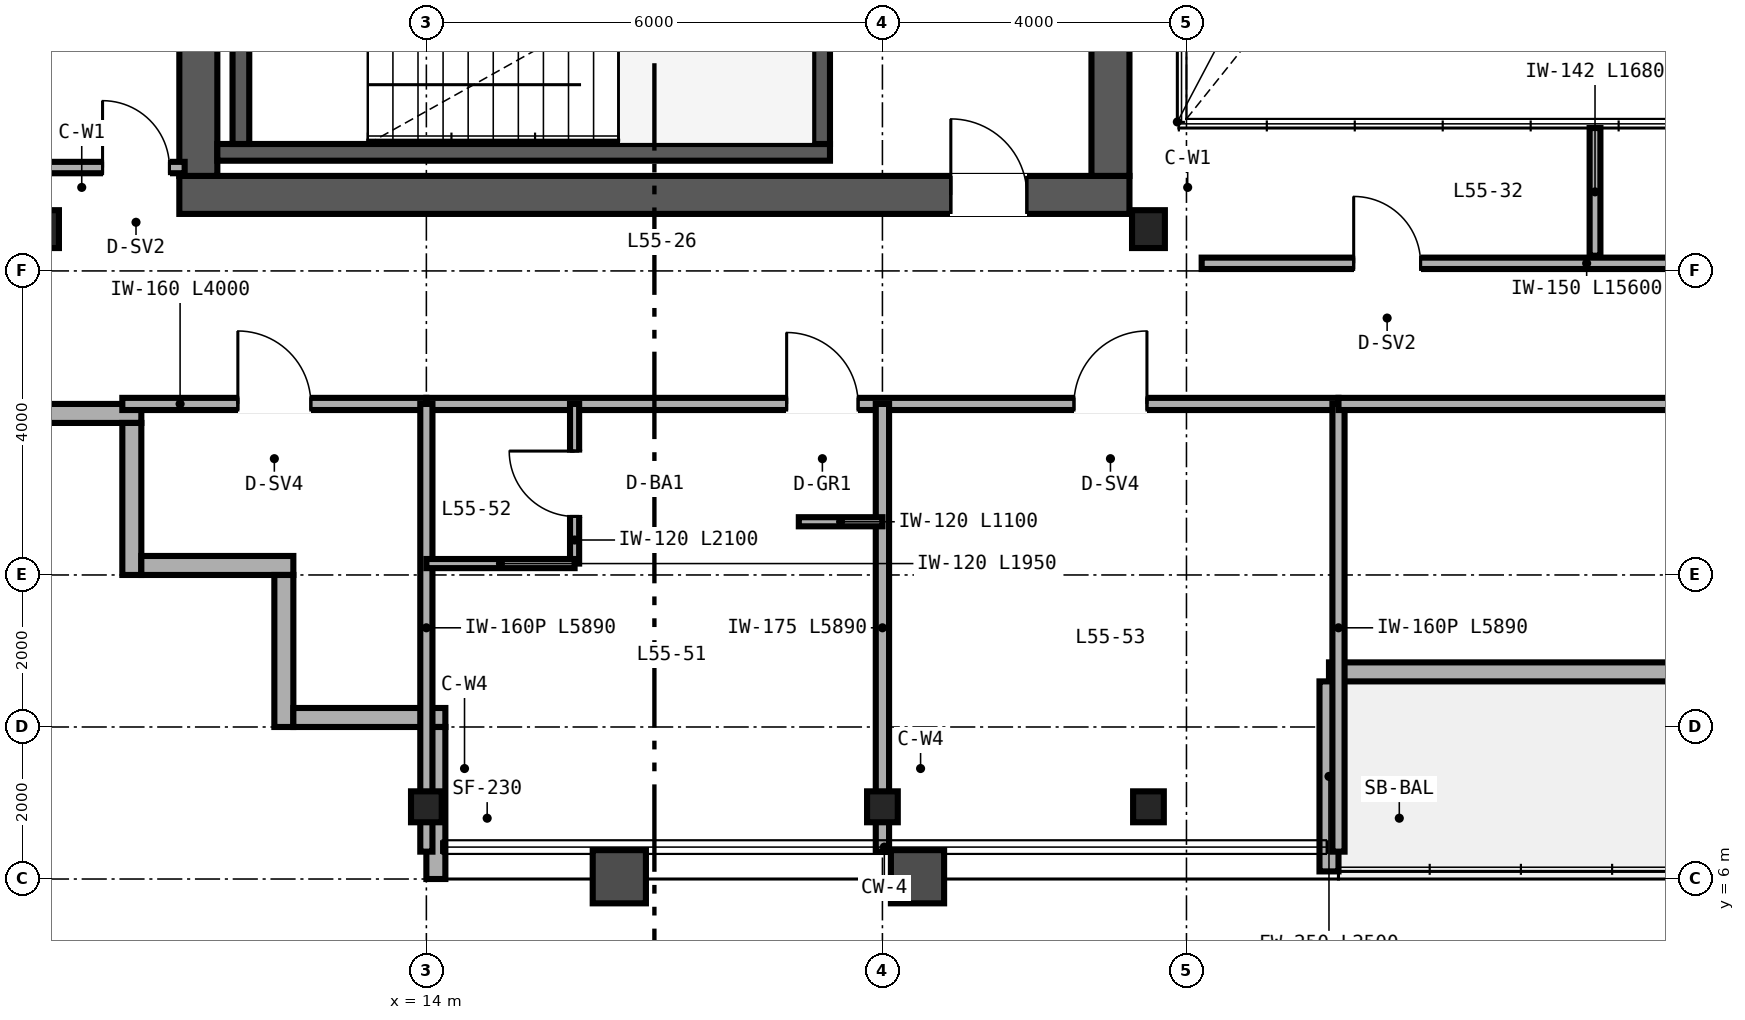
"""IFC4 building model, lengths in metres.
Left out: names, types, materials, properties, quantities, classifications, styles, units other than length and angle.
Written with IfcOpenShell. Run it as: python <this file> out.ifc"""

import sys

from ifc_helpers import new_model, si_unit, direction, frame, frame_2d, origin, origin_2d, place, context, subcontext, project, spatial, rectangle, i_section, extrude, source, transform, mapped, element, fill, save


model = new_model("IFC4")
c1 = context("Model", 3, precision=1e-05, world=origin(), true_north=direction((0.0, 1.0)))
c2 = subcontext(c1, "Body", "Model", "MODEL_VIEW")
j1 = project(units=[si_unit("LENGTHUNIT", "METRE"), si_unit("PLANEANGLEUNIT", "RADIAN")], contexts=[c1])
p1 = place(None, origin())
s1 = spatial("IfcSite", under=j1, at=p1, CompositionType="ELEMENT")
p2 = place(p1, origin())
s2 = spatial("IfcBuilding", under=s1, at=p2, CompositionType="ELEMENT")
p3 = place(p2, frame((0.0, 0.0, 217.2)))
s3 = spatial("IfcBuildingStorey", under=s2, at=p3, CompositionType="ELEMENT", Elevation=217.2)
p4 = place(p3, frame((10.75, 15.0, 0.0), z_axis=(0.0, 0.0, 1.0), x_axis=(1.0, 0.0, 0.0)))
e1 = element("IfcWall", 1, at=p4, inside=s3, PredefinedType="SHEAR", context=c2, shape_type="SweptSolid", body=[
    extrude(rectangle(XDim=12.5, YDim=0.5, at=frame_2d((6.25, 0.0))), origin(), (0.0, 0.0, 1.0), 3.28),
])
p5 = place(p4, frame((10.15, 0.0, 0.0)))
e2 = element("IfcOpeningElement", 2, at=p5, cuts=e1, PredefinedType="OPENING", context=c2, shape_type="SweptSolid", body=[
    extrude(rectangle(XDim=1.0, YDim=2.15, at=frame_2d((0.5, 1.075))), frame((0.0, 0.26, 0.0), z_axis=(0.0, -1.0, 0.0), x_axis=(1.0, 0.0, 0.0)), (0.0, 0.0, 1.0), 0.52),
])
for number, where, z_axis, x_axis in (
    (3, (11.0, 15.25, 0.0), (0.0, 0.0, 1.0), (0.0, 1.0, 0.0)),
    (4, (23.0, 15.25, 0.0), (0.0, 0.0, 1.0), (0.0, 1.0, 0.0)),
):
    element("IfcWall", number, at=place(p3, frame(where, z_axis=z_axis, x_axis=x_axis)), inside=s3, PredefinedType="SHEAR", context=c2, shape_type="SweptSolid", body=[
        extrude(rectangle(XDim=21.5, YDim=0.5, at=frame_2d((10.75, 0.0))), origin(), (0.0, 0.0, 1.0), 3.28),
    ])
p6 = place(p3, frame((11.25, 15.56, 0.0), z_axis=(0.0, 0.0, 1.0), x_axis=(1.0, 0.0, 0.0)))
e5 = element("IfcWall", 5, at=p6, inside=s3, PredefinedType="SHEAR", context=c2, shape_type="SweptSolid", body=[
    extrude(rectangle(XDim=8.06, YDim=0.22, at=frame_2d((4.03, 0.0))), origin(), (0.0, 0.0, 1.0), 3.4),
])
for number, where, z_axis, x_axis in (
    (6, (11.56, 15.67, 0.0), (0.0, 0.0, 1.0), (0.0, 1.0, 0.0)),
    (7, (19.2, 15.67, 0.0), (0.0, 0.0, 1.0), (0.0, 1.0, 0.0)),
):
    element("IfcWall", number, at=place(p3, frame(where, z_axis=z_axis, x_axis=x_axis)), inside=s3, PredefinedType="SHEAR", context=c2, shape_type="SweptSolid", body=[
        extrude(rectangle(XDim=3.28, YDim=0.22, at=frame_2d((1.64, 0.0))), origin(), (0.0, 0.0, 1.0), 3.4),
    ])
m1 = source(origin(), c2, "Body", "SweptSolid", [
    extrude(i_section(OverallWidth=0.432, OverallDepth=0.498, WebThickness=0.056, FlangeThickness=0.089, FilletRadius=0.025, at=origin_2d()), origin(), (0.0, 0.0, 1.0), 3.28),
])
for number, where, z_axis, x_axis in (
    (8, (8.95, 14.55, 0.0), (0.0, 0.0, 1.0), (1.0, 0.0, 0.0)),
    (9, (23.5, 14.55, 0.0), (0.0, 0.0, 1.0), (1.0, 0.0, 0.0)),
):
    element("IfcColumn", number, at=place(p3, frame(where, z_axis=z_axis, x_axis=x_axis)), inside=s3, PredefinedType="COLUMN", context=c2, shape_type="MappedRepresentation", body=[
        mapped(m1, transform((0.0, 0.0, 0.0), scale=1.0)),
    ])
m2 = source(origin(), c2, "Body", "SweptSolid", [
    extrude(i_section(OverallWidth=0.404, OverallDepth=0.407, WebThickness=0.027, FlangeThickness=0.044, FilletRadius=0.025, at=origin_2d()), origin(), (0.0, 0.0, 1.0), 3.28),
])
for number, where, z_axis, x_axis in (
    (10, (14.0, 6.95, 0.0), (0.0, 0.0, 1.0), (1.0, 0.0, 0.0)),
    (11, (20.0, 6.95, 0.0), (0.0, 0.0, 1.0), (1.0, 0.0, 0.0)),
    (12, (23.5, 6.95, 0.0), (0.0, 0.0, 1.0), (1.0, 0.0, 0.0)),
):
    element("IfcColumn", number, at=place(p3, frame(where, z_axis=z_axis, x_axis=x_axis)), inside=s3, PredefinedType="COLUMN", context=c2, shape_type="MappedRepresentation", body=[
        mapped(m2, transform((0.0, 0.0, 0.0), scale=1.0)),
    ])
p7 = place(p3, frame((8.0, 12.125, 0.0), z_axis=(0.0, 0.0, 1.0), x_axis=(1.0, 0.0, 0.0)))
e13 = element("IfcWall", 13, at=p7, inside=s3, PredefinedType="SOLIDWALL", context=c2, shape_type="SweptSolid", body=[
    extrude(rectangle(XDim=2.25, YDim=0.25, at=frame_2d((1.125, 0.0))), origin(), (0.0, 0.0, 1.0), 3.28),
])
for number, where, z_axis, x_axis in (
    (14, (10.125, 12.0, 0.0), (0.0, 0.0, 1.0), (0.0, -1.0, 0.0)),
    (15, (10.25, 10.125, 0.0), (0.0, 0.0, 1.0), (1.0, 0.0, 0.0)),
    (16, (12.125, 10.0, 0.0), (0.0, 0.0, 1.0), (0.0, -1.0, 0.0)),
    (17, (12.25, 8.125, 0.0), (0.0, 0.0, 1.0), (1.0, 0.0, 0.0)),
):
    element("IfcWall", number, at=place(p3, frame(where, z_axis=z_axis, x_axis=x_axis)), inside=s3, PredefinedType="SOLIDWALL", context=c2, shape_type="SweptSolid", body=[
        extrude(rectangle(XDim=2.0, YDim=0.25, at=frame_2d((1.0, 0.0))), origin(), (0.0, 0.0, 1.0), 3.28),
    ])
p8 = place(p3, frame((14.125, 8.0, 0.0), z_axis=(0.0, 0.0, 1.0), x_axis=(0.0, -1.0, 0.0)))
e18 = element("IfcWall", 18, at=p8, inside=s3, PredefinedType="SOLIDWALL", context=c2, shape_type="SweptSolid", body=[
    extrude(rectangle(XDim=2.0, YDim=0.25, at=frame_2d((1.0, 0.0))), origin(), (0.0, 0.0, 1.0), 2.587),
])
p9 = place(p3, frame((25.875, 8.725, 0.0), z_axis=(0.0, 0.0, 1.0), x_axis=(1.0, 0.0, 0.0)))
e19 = element("IfcWall", 19, at=p9, inside=s3, PredefinedType="SOLIDWALL", context=c2, shape_type="SweptSolid", body=[
    extrude(rectangle(XDim=12.25, YDim=0.25, at=frame_2d((6.125, 0.0))), origin(), (0.0, 0.0, 1.0), 3.28),
])
p10 = place(p9, frame((5.6, 0.0, 0.0)))
e20 = element("IfcOpeningElement", 20, at=p10, cuts=e19, PredefinedType="OPENING", context=c2, shape_type="SweptSolid", body=[
    extrude(rectangle(XDim=1.05, YDim=2.15, at=frame_2d((0.525, 1.075))), frame((0.0, 0.135, 0.0), z_axis=(0.0, -1.0, 0.0), x_axis=(1.0, 0.0, 0.0)), (0.0, 0.0, 1.0), 0.27),
])
p11 = place(p3, frame((25.875, 6.1, 0.0), z_axis=(0.0, 0.0, 1.0), x_axis=(0.0, 1.0, 0.0)))
e21 = element("IfcWall", 21, at=p11, inside=s3, PredefinedType="SOLIDWALL", context=c2, shape_type="SweptSolid", body=[
    extrude(rectangle(XDim=2.5, YDim=0.25, at=frame_2d((1.25, 0.0))), origin(), (0.0, 0.0, 1.0), 2.353),
])
p12 = place(p3, frame((24.2, 14.1, 0.0), z_axis=(0.0, 0.0, 1.0), x_axis=(1.0, 0.0, 0.0)))
e22 = element("IfcWall", 22, at=p12, inside=s3, PredefinedType="PARTITIONING", context=c2, shape_type="SweptSolid", body=[
    extrude(rectangle(XDim=15.6, YDim=0.15, at=frame_2d((7.8, 0.0))), origin(), (0.0, 0.0, 1.0), 3.28),
])
p13 = place(p12, frame((2.0, 0.0, 0.0)))
e23 = element("IfcOpeningElement", 23, at=p13, cuts=e22, PredefinedType="OPENING", context=c2, shape_type="SweptSolid", body=[
    extrude(rectangle(XDim=0.88, YDim=2.15, at=frame_2d((0.44, 1.075))), frame((0.0, 0.085, 0.0), z_axis=(0.0, -1.0, 0.0), x_axis=(1.0, 0.0, 0.0)), (0.0, 0.0, 1.0), 0.17),
])
p14 = place(p12, frame((7.25, 0.0, 0.0)))
e24 = element("IfcOpeningElement", 24, at=p14, cuts=e22, PredefinedType="OPENING", context=c2, shape_type="SweptSolid", body=[
    extrude(rectangle(XDim=0.88, YDim=2.15, at=frame_2d((0.44, 1.075))), frame((0.0, 0.085, 0.0), z_axis=(0.0, -1.0, 0.0), x_axis=(1.0, 0.0, 0.0)), (0.0, 0.0, 1.0), 0.17),
])
p15 = place(p12, frame((12.5, 0.0, 0.0)))
e25 = element("IfcOpeningElement", 25, at=p15, cuts=e22, PredefinedType="OPENING", context=c2, shape_type="SweptSolid", body=[
    extrude(rectangle(XDim=0.88, YDim=2.15, at=frame_2d((0.44, 1.075))), frame((0.0, 0.085, 0.0), z_axis=(0.0, -1.0, 0.0), x_axis=(1.0, 0.0, 0.0)), (0.0, 0.0, 1.0), 0.17),
])
p16 = place(p3, frame((29.375, 14.2, 0.0), z_axis=(0.0, 0.0, 1.0), x_axis=(0.0, 1.0, 0.0)))
e26 = element("IfcWall", 26, at=p16, inside=s3, PredefinedType="PARTITIONING", context=c2, shape_type="SweptSolid", body=[
    extrude(rectangle(XDim=1.68, YDim=0.142, at=frame_2d((0.84, 0.0))), origin(), (0.0, 0.0, 1.0), 3.28),
])
p17 = place(p3, frame((8.16, 15.36, 0.0), z_axis=(0.0, 0.0, 1.0), x_axis=(1.0, 0.0, 0.0)))
e27 = element("IfcWall", 27, at=p17, inside=s3, PredefinedType="PARTITIONING", context=c2, shape_type="SweptSolid", body=[
    extrude(rectangle(XDim=2.66, YDim=0.15, at=frame_2d((1.33, 0.0))), origin(), (0.0, 0.0, 1.0), 2.501),
])
p18 = place(p17, frame((1.58, 0.0, 0.0)))
e28 = element("IfcOpeningElement", 28, at=p18, cuts=e27, PredefinedType="OPENING", context=c2, shape_type="SweptSolid", body=[
    extrude(rectangle(XDim=0.88, YDim=2.15, at=frame_2d((0.44, 1.075))), frame((0.0, 0.085, 0.0), z_axis=(0.0, -1.0, 0.0), x_axis=(1.0, 0.0, 0.0)), (0.0, 0.0, 1.0), 0.17),
])
p19 = place(p3, frame((10.0, 12.25, 0.0), z_axis=(0.0, 0.0, 1.0), x_axis=(1.0, 0.0, 0.0)))
e29 = element("IfcWall", 29, at=p19, inside=s3, PredefinedType="PARTITIONING", context=c2, shape_type="SweptSolid", body=[
    extrude(rectangle(XDim=4.0, YDim=0.16, at=frame_2d((2.0, 0.0))), origin(), (0.0, 0.0, 1.0), 3.28),
])
p20 = place(p19, frame((1.52, 0.0, 0.0)))
e30 = element("IfcOpeningElement", 30, at=p20, cuts=e29, PredefinedType="OPENING", context=c2, shape_type="SweptSolid", body=[
    extrude(rectangle(XDim=0.96, YDim=2.15, at=frame_2d((0.48, 1.075))), frame((0.0, 0.09, 0.0), z_axis=(0.0, -1.0, 0.0), x_axis=(1.0, 0.0, 0.0)), (0.0, 0.0, 1.0), 0.18),
])
p21 = place(p3, frame((14.0, 12.25, 0.0), z_axis=(0.0, 0.0, 1.0), x_axis=(1.0, 0.0, 0.0)))
e31 = element("IfcWall", 31, at=p21, inside=s3, PredefinedType="PARTITIONING", context=c2, shape_type="SweptSolid", body=[
    extrude(rectangle(XDim=12.0, YDim=0.16, at=frame_2d((6.0, 0.0))), origin(), (0.0, 0.0, 1.0), 2.823),
])
p22 = place(p21, frame((4.74, 0.0, 0.0)))
e32 = element("IfcOpeningElement", 32, at=p22, cuts=e31, PredefinedType="OPENING", context=c2, shape_type="SweptSolid", body=[
    extrude(rectangle(XDim=0.94, YDim=2.15, at=frame_2d((0.47, 1.075))), frame((0.0, 0.09, 0.0), z_axis=(0.0, -1.0, 0.0), x_axis=(1.0, 0.0, 0.0)), (0.0, 0.0, 1.0), 0.18),
])
p23 = place(p21, frame((8.52, 0.0, 0.0)))
e33 = element("IfcOpeningElement", 33, at=p23, cuts=e31, PredefinedType="OPENING", context=c2, shape_type="SweptSolid", body=[
    extrude(rectangle(XDim=0.96, YDim=2.15, at=frame_2d((0.48, 1.075))), frame((0.0, 0.09, 0.0), z_axis=(0.0, -1.0, 0.0), x_axis=(1.0, 0.0, 0.0)), (0.0, 0.0, 1.0), 0.18),
])
p24 = place(p3, frame((14.0, 6.36, 0.0), z_axis=(0.0, 0.0, 1.0), x_axis=(0.0, 1.0, 0.0)))
e34 = element("IfcWall", 34, at=p24, inside=s3, PredefinedType="PARTITIONING", context=c2, shape_type="SweptSolid", body=[
    extrude(rectangle(XDim=5.89, YDim=0.16, at=frame_2d((2.945, 0.0))), origin(), (0.0, 0.0, 1.0), 2.587),
])
p25 = place(p3, frame((26.0, 6.36, 0.0), z_axis=(0.0, 0.0, 1.0), x_axis=(0.0, 1.0, 0.0)))
e35 = element("IfcWall", 35, at=p25, inside=s3, PredefinedType="PARTITIONING", context=c2, shape_type="SweptSolid", body=[
    extrude(rectangle(XDim=5.89, YDim=0.16, at=frame_2d((2.945, 0.0))), origin(), (0.0, 0.0, 1.0), 2.36),
])
p26 = place(p3, frame((20.0, 6.36, 0.0), z_axis=(0.0, 0.0, 1.0), x_axis=(0.0, 1.0, 0.0)))
e36 = element("IfcWall", 36, at=p26, inside=s3, PredefinedType="PARTITIONING", context=c2, shape_type="SweptSolid", body=[
    extrude(rectangle(XDim=5.89, YDim=0.175, at=frame_2d((2.945, 0.0))), origin(), (0.0, 0.0, 1.0), 2.587),
])
p27 = place(p3, frame((15.95, 10.15, 0.0), z_axis=(0.0, 0.0, 1.0), x_axis=(0.0, 1.0, 0.0)))
e37 = element("IfcWall", 37, at=p27, inside=s3, PredefinedType="PARTITIONING", context=c2, shape_type="SweptSolid", body=[
    extrude(rectangle(XDim=2.1, YDim=0.12, at=frame_2d((1.05, 0.0))), origin(), (0.0, 0.0, 1.0), 3.28),
])
p28 = place(p27, frame((0.62, 0.0, 0.0)))
e38 = element("IfcOpeningElement", 38, at=p28, cuts=e37, PredefinedType="OPENING", context=c2, shape_type="SweptSolid", body=[
    extrude(rectangle(XDim=0.86, YDim=2.1, at=frame_2d((0.43, 1.05))), frame((0.0, 0.07, 0.0), z_axis=(0.0, -1.0, 0.0), x_axis=(1.0, 0.0, 0.0)), (0.0, 0.0, 1.0), 0.14),
])
p29 = place(p3, frame((14.0, 10.15, 0.0), z_axis=(0.0, 0.0, 1.0), x_axis=(1.0, 0.0, 0.0)))
e39 = element("IfcWall", 39, at=p29, inside=s3, PredefinedType="PARTITIONING", context=c2, shape_type="SweptSolid", body=[
    extrude(rectangle(XDim=1.95, YDim=0.12, at=frame_2d((0.975, 0.0))), origin(), (0.0, 0.0, 1.0), 3.28),
])
p30 = place(p3, frame((18.9, 10.7, 0.0), z_axis=(0.0, 0.0, 1.0), x_axis=(1.0, 0.0, 0.0)))
e40 = element("IfcWall", 40, at=p30, inside=s3, PredefinedType="PARTITIONING", context=c2, shape_type="SweptSolid", body=[
    extrude(rectangle(XDim=1.1, YDim=0.12, at=frame_2d((0.55, 0.0))), origin(), (0.0, 0.0, 1.0), 3.28),
])
p31 = place(p3, frame((26.0, 12.25, 0.0), z_axis=(0.0, 0.0, 1.0), x_axis=(1.0, 0.0, 0.0)))
e41 = element("IfcWall", 41, at=p31, inside=s3, PredefinedType="PARTITIONING", context=c2, shape_type="SweptSolid", body=[
    extrude(rectangle(XDim=12.0, YDim=0.16, at=frame_2d((6.0, 0.0))), origin(), (0.0, 0.0, 1.0), 3.28),
])
p32 = place(p31, frame((5.2, 0.0, 0.0)))
e42 = element("IfcOpeningElement", 42, at=p32, cuts=e41, PredefinedType="OPENING", context=c2, shape_type="SweptSolid", body=[
    extrude(rectangle(XDim=0.96, YDim=2.15, at=frame_2d((0.48, 1.075))), frame((0.0, 0.09, 0.0), z_axis=(0.0, -1.0, 0.0), x_axis=(1.0, 0.0, 0.0)), (0.0, 0.0, 1.0), 0.18),
])
m3 = source(origin(), c2, "Body", "SweptSolid", [
    extrude(rectangle(XDim=1.0, YDim=2.15, at=frame_2d((0.5, 1.075))), frame((0.0, 0.025, 0.0), z_axis=(0.0, -1.0, 0.0), x_axis=(1.0, 0.0, 0.0)), (0.0, 0.0, 1.0), 0.05),
])
p33 = place(p5, origin())
e43 = element("IfcDoor", 43, at=p33, inside=s3, OperationType="SINGLE_SWING_LEFT", PredefinedType="DOOR", context=c2, shape_type="MappedRepresentation", body=[
    mapped(m3, transform((0.0, 0.0, 0.0), scale=1.0)),
])
fill(e2, e43)
m4 = source(origin(), c2, "Body", "SweptSolid", [
    extrude(rectangle(XDim=0.88, YDim=2.15, at=frame_2d((0.44, 1.075))), frame((0.0, 0.025, 0.0), z_axis=(0.0, -1.0, 0.0), x_axis=(1.0, 0.0, 0.0)), (0.0, 0.0, 1.0), 0.05),
])
p34 = place(p13, origin())
e44 = element("IfcDoor", 44, at=p34, inside=s3, OperationType="SINGLE_SWING_LEFT", PredefinedType="DOOR", context=c2, shape_type="MappedRepresentation", body=[
    mapped(m4, transform((0.0, 0.0, 0.0), scale=1.0)),
])
fill(e23, e44)
p35 = place(p18, origin())
e45 = element("IfcDoor", 45, at=p35, inside=s3, OperationType="SINGLE_SWING_LEFT", PredefinedType="DOOR", context=c2, shape_type="MappedRepresentation", body=[
    mapped(m4, transform((0.0, 0.0, 0.0), scale=1.0)),
])
fill(e28, e45)
m5 = source(origin(), c2, "Body", "SweptSolid", [
    extrude(rectangle(XDim=0.96, YDim=2.15, at=frame_2d((0.48, 1.075))), frame((0.0, 0.025, 0.0), z_axis=(0.0, -1.0, 0.0), x_axis=(1.0, 0.0, 0.0)), (0.0, 0.0, 1.0), 0.05),
])
p36 = place(p20, origin())
e46 = element("IfcDoor", 46, at=p36, inside=s3, OperationType="SINGLE_SWING_LEFT", PredefinedType="DOOR", context=c2, shape_type="MappedRepresentation", body=[
    mapped(m5, transform((0.0, 0.0, 0.0), scale=1.0)),
])
fill(e30, e46)
m6 = source(origin(), c2, "Body", "SweptSolid", [
    extrude(rectangle(XDim=0.86, YDim=2.1, at=frame_2d((0.43, 1.05))), frame((0.0, 0.025, 0.0), z_axis=(0.0, -1.0, 0.0), x_axis=(1.0, 0.0, 0.0)), (0.0, 0.0, 1.0), 0.05),
])
p37 = place(p28, origin())
e47 = element("IfcDoor", 47, at=p37, inside=s3, OperationType="SINGLE_SWING_RIGHT", PredefinedType="DOOR", context=c2, shape_type="MappedRepresentation", body=[
    mapped(m6, transform((0.0, 0.0, 0.0), scale=1.0)),
])
fill(e38, e47)
m7 = source(origin(), c2, "Body", "SweptSolid", [
    extrude(rectangle(XDim=0.94, YDim=2.15, at=frame_2d((0.47, 1.075))), frame((0.0, 0.025, 0.0), z_axis=(0.0, -1.0, 0.0), x_axis=(1.0, 0.0, 0.0)), (0.0, 0.0, 1.0), 0.05),
])
p38 = place(p22, origin())
e48 = element("IfcDoor", 48, at=p38, inside=s3, OperationType="SINGLE_SWING_LEFT", PredefinedType="DOOR", context=c2, shape_type="MappedRepresentation", body=[
    mapped(m7, transform((0.0, 0.0, 0.0), scale=1.0)),
])
fill(e32, e48)
p39 = place(p23, origin())
e49 = element("IfcDoor", 49, at=p39, inside=s3, OperationType="SINGLE_SWING_RIGHT", PredefinedType="DOOR", context=c2, shape_type="MappedRepresentation", body=[
    mapped(m5, transform((0.0, 0.0, 0.0), scale=1.0)),
])
fill(e33, e49)
save(model, sys.argv[1])
